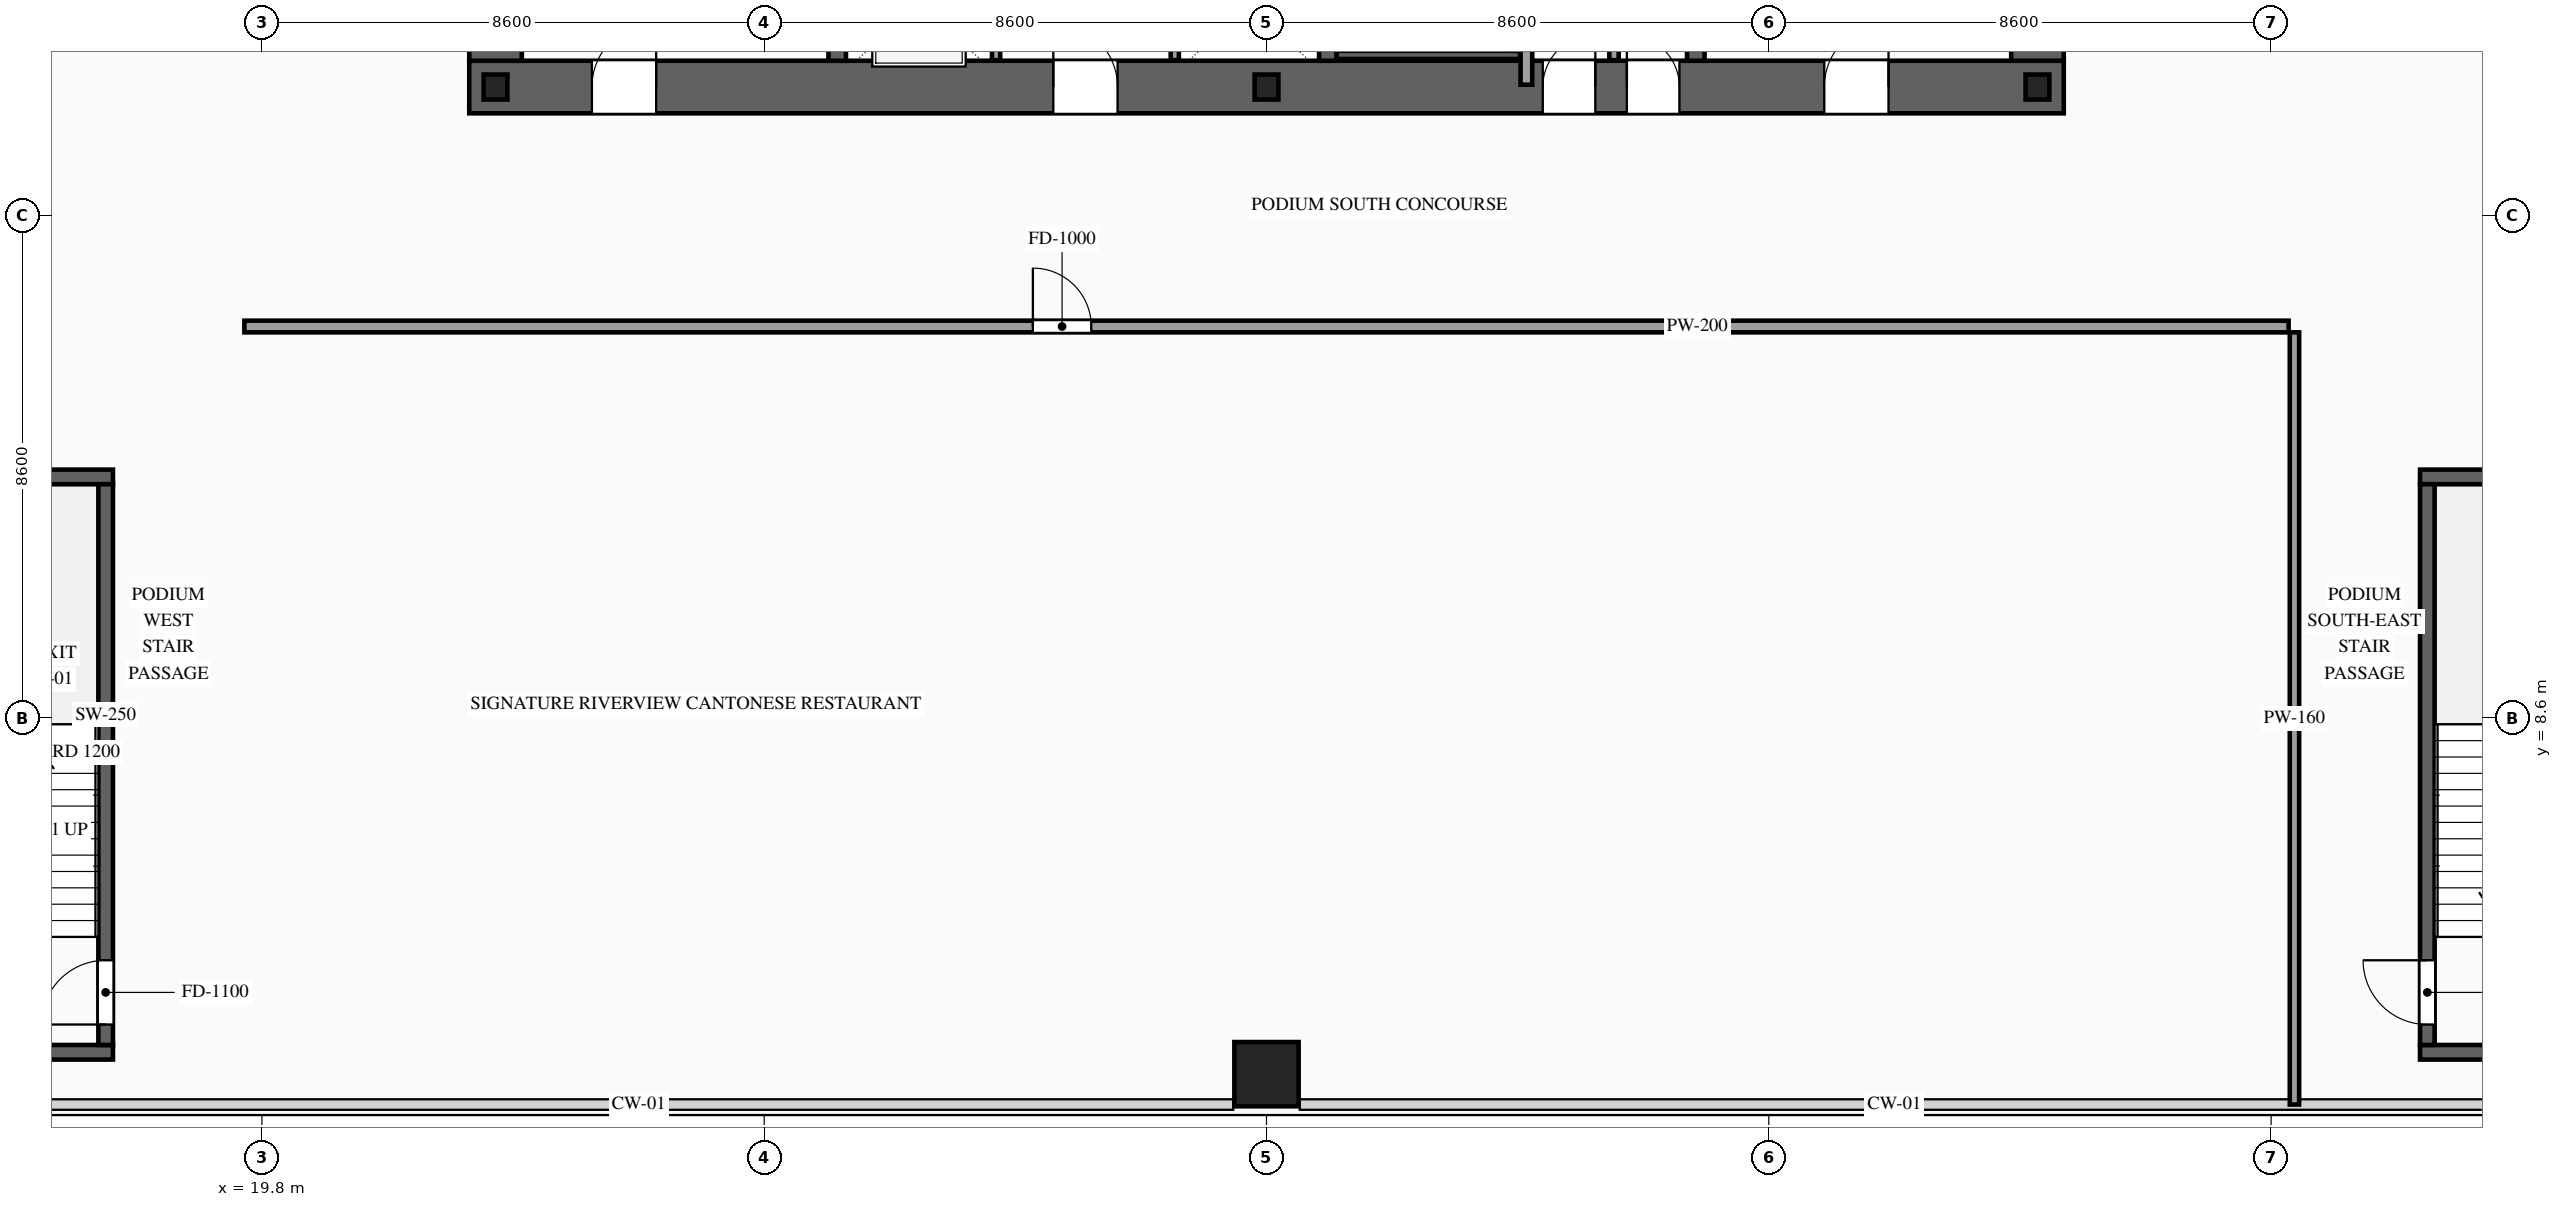
"""IFC4 building model, lengths in metres.
Left out: names, types, materials, properties, quantities, classifications, styles, units other than length and angle.
Written with IfcOpenShell. Run it as: python <this file> out.ifc"""

import sys

from ifc_helpers import new_model, si_unit, direction, frame, frame_2d, origin, origin_2d, place, context, subcontext, project, spatial, rectangle, i_section, extrude, source, transform, mapped, element, fill, save


model = new_model("IFC4")
c1 = context("Model", 3, precision=1e-05, world=origin(), true_north=direction((0.0, 1.0)))
c2 = subcontext(c1, "Body", "Model", "MODEL_VIEW")
j1 = project(units=[si_unit("LENGTHUNIT", "METRE"), si_unit("PLANEANGLEUNIT", "RADIAN")], contexts=[c1])
p1 = place(None, origin())
s1 = spatial("IfcSite", under=j1, at=p1, CompositionType="ELEMENT")
p2 = place(p1, origin())
s2 = spatial("IfcBuilding", under=s1, at=p2, CompositionType="ELEMENT")
p3 = place(p2, frame((0.0, 0.0, 10.2)))
s3 = spatial("IfcBuildingStorey", under=s2, at=p3, CompositionType="ELEMENT", Elevation=10.2)
p4 = place(p3, frame((23.35, 19.4, 0.0), z_axis=(0.0, 0.0, 1.0), x_axis=(1.0, 0.0, 0.0)))
e1 = element("IfcWall", 1, at=p4, inside=s3, PredefinedType="SHEAR", context=c2, shape_type="SweptSolid", body=[
    extrude(rectangle(XDim=27.3, YDim=0.9, at=frame_2d((13.65, 0.0))), origin(), (0.0, 0.0, 1.0), 4.8),
])
p5 = place(p4, frame((2.1, 0.0, 0.0)))
e2 = element("IfcOpeningElement", 2, at=p5, cuts=e1, PredefinedType="OPENING", context=c2, shape_type="SweptSolid", body=[
    extrude(rectangle(XDim=1.1, YDim=2.2, at=frame_2d((0.55, 1.1))), frame((0.0, 0.465, 0.0), z_axis=(0.0, -1.0, 0.0), x_axis=(1.0, 0.0, 0.0)), (0.0, 0.0, 1.0), 0.93),
])
p6 = place(p4, frame((10.0, 0.0, 0.0)))
e3 = element("IfcOpeningElement", 3, at=p6, cuts=e1, PredefinedType="OPENING", context=c2, shape_type="SweptSolid", body=[
    extrude(rectangle(XDim=1.1, YDim=2.2, at=frame_2d((0.55, 1.1))), frame((0.0, 0.465, 0.0), z_axis=(0.0, -1.0, 0.0), x_axis=(1.0, 0.0, 0.0)), (0.0, 0.0, 1.0), 0.93),
])
p7 = place(p4, frame((23.2, 0.0, 0.0)))
e4 = element("IfcOpeningElement", 4, at=p7, cuts=e1, PredefinedType="OPENING", context=c2, shape_type="SweptSolid", body=[
    extrude(rectangle(XDim=1.1, YDim=2.2, at=frame_2d((0.55, 1.1))), frame((0.0, 0.465, 0.0), z_axis=(0.0, -1.0, 0.0), x_axis=(1.0, 0.0, 0.0)), (0.0, 0.0, 1.0), 0.93),
])
p8 = place(p4, frame((19.82, 0.0, 0.0)))
e5 = element("IfcOpeningElement", 5, at=p8, cuts=e1, PredefinedType="OPENING", context=c2, shape_type="SweptSolid", body=[
    extrude(rectangle(XDim=0.9, YDim=2.15, at=frame_2d((0.45, 1.075))), frame((0.0, 0.465, 0.0), z_axis=(0.0, -1.0, 0.0), x_axis=(1.0, 0.0, 0.0)), (0.0, 0.0, 1.0), 0.93),
])
p9 = place(p4, frame((18.38, 0.0, 0.0)))
e6 = element("IfcOpeningElement", 6, at=p9, cuts=e1, PredefinedType="OPENING", context=c2, shape_type="SweptSolid", body=[
    extrude(rectangle(XDim=0.9, YDim=2.15, at=frame_2d((0.45, 1.075))), frame((0.0, 0.465, 0.0), z_axis=(0.0, -1.0, 0.0), x_axis=(1.0, 0.0, 0.0)), (0.0, 0.0, 1.0), 0.93),
])
m1 = source(origin(), c2, "Body", "SweptSolid", [
    extrude(rectangle(XDim=11.9, YDim=0.9, at=frame_2d((5.95, 0.0))), origin(), (0.0, 0.0, 1.0), 4.8),
])
for number, where, z_axis, x_axis in (
    (7, (23.8, 19.85, 0.0), (0.0, 0.0, 1.0), (0.0, 1.0, 0.0)),
    (8, (50.2, 19.85, 0.0), (0.0, 0.0, 1.0), (0.0, 1.0, 0.0)),
):
    element("IfcWall", number, at=place(p3, frame(where, z_axis=z_axis, x_axis=x_axis)), inside=s3, PredefinedType="SHEAR", context=c2, shape_type="MappedRepresentation", body=[
        mapped(m1, transform((0.0, 0.0, 0.0), scale=1.0)),
    ])
m2 = source(origin(), c2, "Body", "SweptSolid", [
    extrude(rectangle(XDim=11.9, YDim=0.3, at=frame_2d((5.95, 0.0))), origin(), (0.0, 0.0, 1.0), 4.8),
])
for number, where, z_axis, x_axis in (
    (9, (29.65, 19.85, 0.0), (0.0, 0.0, 1.0), (0.0, 1.0, 0.0)),
    (10, (38.05, 19.85, 0.0), (0.0, 0.0, 1.0), (0.0, 1.0, 0.0)),
    (11, (44.35, 19.85, 0.0), (0.0, 0.0, 1.0), (0.0, 1.0, 0.0)),
):
    element("IfcWall", number, at=place(p3, frame(where, z_axis=z_axis, x_axis=x_axis)), inside=s3, PredefinedType="SOLIDWALL", context=c2, shape_type="MappedRepresentation", body=[
        mapped(m2, transform((0.0, 0.0, 0.0), scale=1.0)),
    ])
m3 = source(origin(), c2, "Body", "SweptSolid", [
    extrude(i_section(OverallWidth=0.407, OverallDepth=0.428, WebThickness=0.02, FlangeThickness=0.035, at=origin_2d()), origin(), (0.0, 0.0, 1.0), 4.8),
])
for number, where, z_axis, x_axis in (
    (12, (23.8, 19.4, 0.0), (0.0, 0.0, 1.0), (1.0, 0.0, 0.0)),
    (13, (37.0, 19.4, 0.0), (0.0, 0.0, 1.0), (1.0, 0.0, 0.0)),
    (14, (50.2, 19.4, 0.0), (0.0, 0.0, 1.0), (1.0, 0.0, 0.0)),
):
    element("IfcColumn", number, at=place(p3, frame(where, z_axis=z_axis, x_axis=x_axis)), inside=s3, PredefinedType="COLUMN", context=c2, shape_type="MappedRepresentation", body=[
        mapped(m3, transform((0.0, 0.0, 0.0), scale=1.0)),
    ])
m4 = source(origin(), c2, "Body", "SweptSolid", [
    extrude(rectangle(XDim=1.1, YDim=1.1, at=origin_2d()), origin(), (0.0, 0.0, 1.0), 4.8),
])
p10 = place(p3, frame((37.0, 2.5, 0.0), z_axis=(0.0, 0.0, 1.0), x_axis=(1.0, 0.0, 0.0)))
e15 = element("IfcColumn", 15, at=p10, inside=s3, PredefinedType="COLUMN", context=c2, shape_type="MappedRepresentation", body=[
    mapped(m4, transform((0.0, 0.0, 0.0), scale=1.0)),
])
p11 = place(p3, frame((32.37, 19.86, 0.0), z_axis=(0.0, 0.0, 1.0), x_axis=(0.0, 1.0, 0.0)))
e16 = element("IfcWall", 16, at=p11, inside=s3, PredefinedType="SOLIDWALL", context=c2, shape_type="SweptSolid", body=[
    extrude(rectangle(XDim=2.04, YDim=0.14, at=frame_2d((1.02, 0.0))), origin(), (0.0, 0.0, 1.0), 4.52),
])
p12 = place(p11, frame((0.47, 0.0, 0.0)))
e17 = element("IfcOpeningElement", 17, at=p12, cuts=e16, PredefinedType="OPENING", context=c2, shape_type="SweptSolid", body=[
    extrude(rectangle(XDim=1.1, YDim=2.2, at=frame_2d((0.55, 1.1))), frame((0.0, 0.085, 0.0), z_axis=(0.0, -1.0, 0.0), x_axis=(1.0, 0.0, 0.0)), (0.0, 0.0, 1.0), 0.17),
])
m5 = source(origin(), c2, "Body", "SweptSolid", [
    extrude(rectangle(XDim=2.04, YDim=0.14, at=frame_2d((1.02, 0.0))), origin(), (0.0, 0.0, 1.0), 4.52),
])
p13 = place(p3, frame((35.43, 19.86, 0.0), z_axis=(0.0, 0.0, 1.0), x_axis=(0.0, 1.0, 0.0)))
e18 = element("IfcWall", 18, at=p13, inside=s3, PredefinedType="SOLIDWALL", context=c2, shape_type="MappedRepresentation", body=[
    mapped(m5, transform((0.0, 0.0, 0.0), scale=1.0)),
])
m6 = source(origin(), c2, "Body", "SweptSolid", [
    extrude(rectangle(XDim=3.14, YDim=0.14, at=frame_2d((1.57, 0.0))), origin(), (0.0, 0.0, 1.0), 4.52),
])
p14 = place(p3, frame((38.2, 19.95, 0.0), z_axis=(0.0, 0.0, 1.0), x_axis=(1.0, 0.0, 0.0)))
e19 = element("IfcWall", 19, at=p14, inside=s3, PredefinedType="SOLIDWALL", context=c2, shape_type="MappedRepresentation", body=[
    mapped(m6, transform((0.0, 0.0, 0.0), scale=1.0)),
])
m7 = source(origin(), c2, "Body", "SweptSolid", [
    extrude(rectangle(XDim=4.3, YDim=0.25, at=frame_2d((2.15, 0.0))), origin(), (0.0, 0.0, 1.0), 4.52),
])
for number, where, z_axis, x_axis in (
    (20, (12.95, 2.875, 0.0), (0.0, 0.0, 1.0), (1.0, 0.0, 0.0)),
    (21, (12.95, 12.725, 0.0), (0.0, 0.0, 1.0), (1.0, 0.0, 0.0)),
):
    element("IfcWall", number, at=place(p3, frame(where, z_axis=z_axis, x_axis=x_axis)), inside=s3, PredefinedType="SOLIDWALL", context=c2, shape_type="MappedRepresentation", body=[
        mapped(m7, transform((0.0, 0.0, 0.0), scale=1.0)),
    ])
p15 = place(p3, frame((17.125, 3.0, 0.0), z_axis=(0.0, 0.0, 1.0), x_axis=(0.0, 1.0, 0.0)))
e22 = element("IfcWall", 22, at=p15, inside=s3, PredefinedType="SOLIDWALL", context=c2, shape_type="SweptSolid", body=[
    extrude(rectangle(XDim=9.6, YDim=0.25, at=frame_2d((4.8, 0.0))), origin(), (0.0, 0.0, 1.0), 4.52),
])
p16 = place(p15, frame((0.35, 0.0, 0.0)))
e23 = element("IfcOpeningElement", 23, at=p16, cuts=e22, PredefinedType="OPENING", context=c2, shape_type="SweptSolid", body=[
    extrude(rectangle(XDim=1.1, YDim=2.2, at=frame_2d((0.55, 1.1))), frame((0.0, 0.14, 0.0), z_axis=(0.0, -1.0, 0.0), x_axis=(1.0, 0.0, 0.0)), (0.0, 0.0, 1.0), 0.28),
])
for number, where, z_axis, x_axis in (
    (24, (56.75, 2.875, 0.0), (0.0, 0.0, 1.0), (1.0, 0.0, 0.0)),
    (25, (56.75, 12.725, 0.0), (0.0, 0.0, 1.0), (1.0, 0.0, 0.0)),
):
    element("IfcWall", number, at=place(p3, frame(where, z_axis=z_axis, x_axis=x_axis)), inside=s3, PredefinedType="SOLIDWALL", context=c2, shape_type="MappedRepresentation", body=[
        mapped(m7, transform((0.0, 0.0, 0.0), scale=1.0)),
    ])
p17 = place(p3, frame((56.875, 3.0, 0.0), z_axis=(0.0, 0.0, 1.0), x_axis=(0.0, 1.0, 0.0)))
e26 = element("IfcWall", 26, at=p17, inside=s3, PredefinedType="SOLIDWALL", context=c2, shape_type="SweptSolid", body=[
    extrude(rectangle(XDim=9.6, YDim=0.25, at=frame_2d((4.8, 0.0))), origin(), (0.0, 0.0, 1.0), 4.52),
])
p18 = place(p17, frame((0.35, 0.0, 0.0)))
e27 = element("IfcOpeningElement", 27, at=p18, cuts=e26, PredefinedType="OPENING", context=c2, shape_type="SweptSolid", body=[
    extrude(rectangle(XDim=1.1, YDim=2.2, at=frame_2d((0.55, 1.1))), frame((0.0, 0.14, 0.0), z_axis=(0.0, -1.0, 0.0), x_axis=(1.0, 0.0, 0.0)), (0.0, 0.0, 1.0), 0.28),
])
m8 = source(origin(), c2, "Body", "SweptSolid", [
    extrude(rectangle(XDim=1.34, YDim=0.16, at=frame_2d((0.67, 0.0))), origin(), (0.0, 0.0, 1.0), 4.52),
])
p19 = place(p3, frame((42.95, 19.86, 0.0), z_axis=(0.0, 0.0, 1.0), x_axis=(0.0, 1.0, 0.0)))
e28 = element("IfcWall", 28, at=p19, inside=s3, PredefinedType="PARTITIONING", context=c2, shape_type="MappedRepresentation", body=[
    mapped(m8, transform((0.0, 0.0, 0.0), scale=1.0)),
])
m9 = source(origin(), c2, "Body", "SweptSolid", [
    extrude(rectangle(XDim=12.72, YDim=0.2, at=frame_2d((6.36, 0.0))), origin(), (0.0, 0.0, 1.0), 4.52),
])
p20 = place(p3, frame((41.45, 19.44, 0.0), z_axis=(0.0, 0.0, 1.0), x_axis=(0.0, 1.0, 0.0)))
e29 = element("IfcWall", 29, at=p20, inside=s3, PredefinedType="PARTITIONING", context=c2, shape_type="MappedRepresentation", body=[
    mapped(m9, transform((0.0, 0.0, 0.0), scale=1.0)),
])
p21 = place(p3, frame((19.5, 15.3, 0.0), z_axis=(0.0, 0.0, 1.0), x_axis=(1.0, 0.0, 0.0)))
e30 = element("IfcWall", 30, at=p21, inside=s3, PredefinedType="PARTITIONING", context=c2, shape_type="SweptSolid", body=[
    extrude(rectangle(XDim=35.0, YDim=0.2, at=frame_2d((17.5, 0.0))), origin(), (0.0, 0.0, 1.0), 4.52),
])
p22 = place(p21, frame((13.5, 0.0, 0.0)))
e31 = element("IfcOpeningElement", 31, at=p22, cuts=e30, PredefinedType="OPENING", context=c2, shape_type="SweptSolid", body=[
    extrude(rectangle(XDim=1.0, YDim=2.2, at=frame_2d((0.5, 1.1))), frame((0.0, 0.115, 0.0), z_axis=(0.0, -1.0, 0.0), x_axis=(1.0, 0.0, 0.0)), (0.0, 0.0, 1.0), 0.23),
])
m10 = source(origin(), c2, "Body", "SweptSolid", [
    extrude(rectangle(XDim=13.22, YDim=0.16, at=frame_2d((6.61, 0.0))), origin(), (0.0, 0.0, 1.0), 4.52),
])
p23 = place(p3, frame((54.6, 1.98, 0.0), z_axis=(0.0, 0.0, 1.0), x_axis=(0.0, 1.0, 0.0)))
e32 = element("IfcWall", 32, at=p23, inside=s3, PredefinedType="PARTITIONING", context=c2, shape_type="MappedRepresentation", body=[
    mapped(m10, transform((0.0, 0.0, 0.0), scale=1.0)),
])
m11 = source(origin(), c2, "Body", "SweptSolid", [
    extrude(rectangle(XDim=1.1, YDim=2.2, at=frame_2d((0.55, 1.1))), frame((0.0, 0.025, 0.0), z_axis=(0.0, -1.0, 0.0), x_axis=(1.0, 0.0, 0.0)), (0.0, 0.0, 1.0), 0.05),
])
p24 = place(p16, origin())
e33 = element("IfcDoor", 33, at=p24, inside=s3, OperationType="SINGLE_SWING_LEFT", PredefinedType="DOOR", context=c2, shape_type="MappedRepresentation", body=[
    mapped(m11, transform((0.0, 0.0, 0.0), scale=1.0)),
])
fill(e23, e33)
p25 = place(p18, origin())
e34 = element("IfcDoor", 34, at=p25, inside=s3, OperationType="SINGLE_SWING_RIGHT", PredefinedType="DOOR", context=c2, shape_type="MappedRepresentation", body=[
    mapped(m11, transform((0.0, 0.0, 0.0), scale=1.0)),
])
fill(e27, e34)
p26 = place(p5, origin())
e35 = element("IfcDoor", 35, at=p26, inside=s3, OperationType="SINGLE_SWING_RIGHT", PredefinedType="DOOR", context=c2, shape_type="MappedRepresentation", body=[
    mapped(m11, transform((0.0, 0.0, 0.0), scale=1.0)),
])
fill(e2, e35)
p27 = place(p6, origin())
e36 = element("IfcDoor", 36, at=p27, inside=s3, OperationType="SINGLE_SWING_LEFT", PredefinedType="DOOR", context=c2, shape_type="MappedRepresentation", body=[
    mapped(m11, transform((0.0, 0.0, 0.0), scale=1.0)),
])
fill(e3, e36)
p28 = place(p7, origin())
e37 = element("IfcDoor", 37, at=p28, inside=s3, OperationType="SINGLE_SWING_RIGHT", PredefinedType="DOOR", context=c2, shape_type="MappedRepresentation", body=[
    mapped(m11, transform((0.0, 0.0, 0.0), scale=1.0)),
])
fill(e4, e37)
m12 = source(origin(), c2, "Body", "SweptSolid", [
    extrude(rectangle(XDim=0.9, YDim=2.15, at=frame_2d((0.45, 1.075))), frame((0.0, 0.025, 0.0), z_axis=(0.0, -1.0, 0.0), x_axis=(1.0, 0.0, 0.0)), (0.0, 0.0, 1.0), 0.05),
])
p29 = place(p8, origin())
e38 = element("IfcDoor", 38, at=p29, inside=s3, OperationType="SINGLE_SWING_LEFT", PredefinedType="DOOR", context=c2, shape_type="MappedRepresentation", body=[
    mapped(m12, transform((0.0, 0.0, 0.0), scale=1.0)),
])
fill(e5, e38)
p30 = place(p9, origin())
e39 = element("IfcDoor", 39, at=p30, inside=s3, OperationType="SINGLE_SWING_RIGHT", PredefinedType="DOOR", context=c2, shape_type="MappedRepresentation", body=[
    mapped(m12, transform((0.0, 0.0, 0.0), scale=1.0)),
])
fill(e6, e39)
m13 = source(origin(), c2, "Body", "SweptSolid", [
    extrude(rectangle(XDim=1.0, YDim=2.2, at=frame_2d((0.5, 1.1))), frame((0.0, 0.025, 0.0), z_axis=(0.0, -1.0, 0.0), x_axis=(1.0, 0.0, 0.0)), (0.0, 0.0, 1.0), 0.05),
])
p31 = place(p22, origin())
e40 = element("IfcDoor", 40, at=p31, inside=s3, OperationType="SINGLE_SWING_LEFT", PredefinedType="DOOR", context=c2, shape_type="MappedRepresentation", body=[
    mapped(m13, transform((0.0, 0.0, 0.0), scale=1.0)),
])
fill(e31, e40)
save(model, sys.argv[1])
